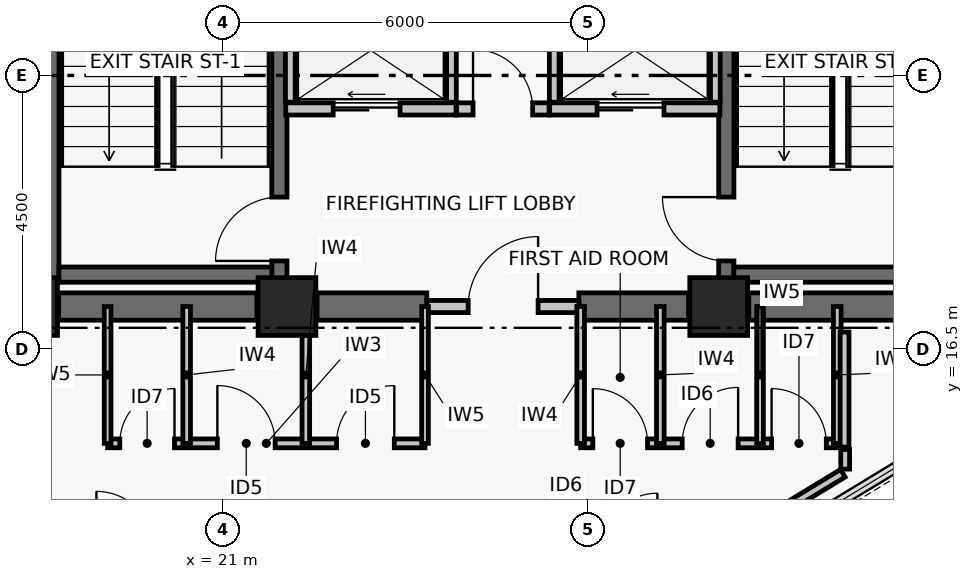
"""IFC4 building model, lengths in metres.
Left out: names, types, materials, properties, quantities, classifications, styles, units other than length and angle.
Written with IfcOpenShell. Run it as: python <this file> out.ifc"""

import sys

from ifc_helpers import new_model, si_unit, direction, frame, frame_2d, origin, origin_2d, place, context, subcontext, project, spatial, rectangle, extrude, element, fill, save


model = new_model("IFC4")
c1 = context("Model", 3, precision=1e-05, world=origin(), true_north=direction((0.0, 1.0)))
c2 = subcontext(c1, "Body", "Model", "MODEL_VIEW")
j1 = project(units=[si_unit("LENGTHUNIT", "METRE"), si_unit("PLANEANGLEUNIT", "RADIAN")], contexts=[c1])
p1 = place(None, origin())
s1 = spatial("IfcSite", under=j1, at=p1, CompositionType="ELEMENT")
p2 = place(p1, origin())
s2 = spatial("IfcBuilding", under=s1, at=p2, CompositionType="ELEMENT")
p3 = place(p2, frame((0.0, 0.0, 269.46)))
s3 = spatial("IfcBuildingStorey", under=s2, at=p3, CompositionType="ELEMENT", Elevation=269.46)
for number, where, z_axis, x_axis in (
    (1, (17.8, 17.2, 0.0), (0.0, 0.0, 1.0), (1.0, 0.0, 0.0)),
    (2, (22.05, 17.2, 0.0), (0.0, 0.0, 1.0), (1.0, 0.0, 0.0)),
    (3, (29.15, 17.2, 0.0), (0.0, 0.0, 1.0), (1.0, 0.0, 0.0)),
):
    element("IfcColumn", number, at=place(p3, frame(where, z_axis=z_axis, x_axis=x_axis)), inside=s3, PredefinedType="COLUMN", context=c2, shape_type="SweptSolid", body=[
        extrude(rectangle(XDim=0.95, YDim=0.95, at=origin_2d()), origin(), (0.0, 0.0, 1.0), 3.72),
    ])
p4 = place(p3, frame((18.295, 17.2, 0.0), z_axis=(0.0, 0.0, 1.0), x_axis=(1.0, 0.0, 0.0)))
e4 = element("IfcWall", 4, at=p4, inside=s3, PredefinedType="SHEAR", context=c2, shape_type="SweptSolid", body=[
    extrude(rectangle(XDim=3.26, YDim=0.45, at=frame_2d((1.63, 0.0))), origin(), (0.0, 0.0, 1.0), 3.5),
])
p5 = place(p3, frame((22.545, 17.2, 0.0), z_axis=(0.0, 0.0, 1.0), x_axis=(1.0, 0.0, 0.0)))
e5 = element("IfcWall", 5, at=p5, inside=s3, PredefinedType="SHEAR", context=c2, shape_type="SweptSolid", body=[
    extrude(rectangle(XDim=1.805, YDim=0.45, at=frame_2d((0.903, 0.0))), origin(), (0.0, 0.0, 1.0), 3.5),
])
p6 = place(p3, frame((26.85, 17.2, 0.0), z_axis=(0.0, 0.0, 1.0), x_axis=(1.0, 0.0, 0.0)))
e6 = element("IfcWall", 6, at=p6, inside=s3, PredefinedType="SHEAR", context=c2, shape_type="SweptSolid", body=[
    extrude(rectangle(XDim=1.805, YDim=0.45, at=frame_2d((0.902, 0.0))), origin(), (0.0, 0.0, 1.0), 3.5),
])
p7 = place(p3, frame((29.645, 17.2, 0.0), z_axis=(0.0, 0.0, 1.0), x_axis=(1.0, 0.0, 0.0)))
e7 = element("IfcWall", 7, at=p7, inside=s3, PredefinedType="SHEAR", context=c2, shape_type="SweptSolid", body=[
    extrude(rectangle(XDim=3.26, YDim=0.45, at=frame_2d((1.63, 0.0))), origin(), (0.0, 0.0, 1.0), 3.5),
])
p8 = place(p3, frame((18.175, 17.6, 0.0), z_axis=(0.0, 0.0, 1.0), x_axis=(0.0, 1.0, 0.0)))
e8 = element("IfcWall", 8, at=p8, inside=s3, PredefinedType="SHEAR", context=c2, shape_type="SweptSolid", body=[
    extrude(rectangle(XDim=8.8, YDim=0.25, at=frame_2d((4.4, 0.0))), origin(), (0.0, 0.0, 1.0), 3.5),
])
p9 = place(p3, frame((21.925, 17.6, 0.0), z_axis=(0.0, 0.0, 1.0), x_axis=(0.0, 1.0, 0.0)))
e9 = element("IfcWall", 9, at=p9, inside=s3, PredefinedType="SHEAR", context=c2, shape_type="SweptSolid", body=[
    extrude(rectangle(XDim=8.8, YDim=0.25, at=frame_2d((4.4, 0.0))), origin(), (0.0, 0.0, 1.0), 3.5),
])
p10 = place(p9, frame((0.35, 0.0, 0.0)))
e10 = element("IfcOpeningElement", 10, at=p10, cuts=e9, PredefinedType="OPENING", context=c2, shape_type="SweptSolid", body=[
    extrude(rectangle(XDim=1.05, YDim=2.08, at=frame_2d((0.525, 1.04))), frame((0.0, 0.135, 0.0), z_axis=(0.0, -1.0, 0.0), x_axis=(1.0, 0.0, 0.0)), (0.0, 0.0, 1.0), 0.27),
])
p11 = place(p3, frame((18.3, 17.725, 0.0), z_axis=(0.0, 0.0, 1.0), x_axis=(1.0, 0.0, 0.0)))
e11 = element("IfcWall", 11, at=p11, inside=s3, PredefinedType="SHEAR", context=c2, shape_type="SweptSolid", body=[
    extrude(rectangle(XDim=3.5, YDim=0.25, at=frame_2d((1.75, 0.0))), origin(), (0.0, 0.0, 1.0), 3.5),
])
p12 = place(p3, frame((29.275, 17.6, 0.0), z_axis=(0.0, 0.0, 1.0), x_axis=(0.0, 1.0, 0.0)))
e12 = element("IfcWall", 12, at=p12, inside=s3, PredefinedType="SHEAR", context=c2, shape_type="SweptSolid", body=[
    extrude(rectangle(XDim=8.8, YDim=0.25, at=frame_2d((4.4, 0.0))), origin(), (0.0, 0.0, 1.0), 3.5),
])
p13 = place(p12, frame((0.35, 0.0, 0.0)))
e13 = element("IfcOpeningElement", 13, at=p13, cuts=e12, PredefinedType="OPENING", context=c2, shape_type="SweptSolid", body=[
    extrude(rectangle(XDim=1.05, YDim=2.08, at=frame_2d((0.525, 1.04))), frame((0.0, 0.135, 0.0), z_axis=(0.0, -1.0, 0.0), x_axis=(1.0, 0.0, 0.0)), (0.0, 0.0, 1.0), 0.27),
])
p14 = place(p3, frame((29.4, 17.725, 0.0), z_axis=(0.0, 0.0, 1.0), x_axis=(1.0, 0.0, 0.0)))
e14 = element("IfcWall", 14, at=p14, inside=s3, PredefinedType="SHEAR", context=c2, shape_type="SweptSolid", body=[
    extrude(rectangle(XDim=3.5, YDim=0.25, at=frame_2d((1.75, 0.0))), origin(), (0.0, 0.0, 1.0), 3.5),
])
p15 = place(p3, frame((24.35, 17.2, 0.0), z_axis=(0.0, 0.0, 1.0), x_axis=(1.0, 0.0, 0.0)))
e15 = element("IfcWall", 15, at=p15, inside=s3, PredefinedType="PARTITIONING", context=c2, shape_type="SweptSolid", body=[
    extrude(rectangle(XDim=2.5, YDim=0.2, at=frame_2d((1.25, 0.0))), origin(), (0.0, 0.0, 1.0), 2.63),
])
p16 = place(p15, frame((0.68, 0.0, 0.0)))
e16 = element("IfcOpeningElement", 16, at=p16, cuts=e15, PredefinedType="OPENING", context=c2, shape_type="SweptSolid", body=[
    extrude(rectangle(XDim=1.15, YDim=2.08, at=frame_2d((0.575, 1.04))), frame((0.0, 0.11, 0.0), z_axis=(0.0, -1.0, 0.0), x_axis=(1.0, 0.0, 0.0)), (0.0, 0.0, 1.0), 0.22),
])
p17 = place(p3, frame((24.84, 20.45, 0.0), z_axis=(0.0, 0.0, 1.0), x_axis=(1.0, 0.0, 0.0)))
e17 = element("IfcWall", 17, at=p17, inside=s3, PredefinedType="PARTITIONING", context=c2, shape_type="SweptSolid", body=[
    extrude(rectangle(XDim=1.52, YDim=0.2, at=frame_2d((0.76, 0.0))), origin(), (0.0, 0.0, 1.0), 3.5),
])
p18 = place(p17, frame((0.27, 0.0, 0.0)))
e18 = element("IfcOpeningElement", 18, at=p18, cuts=e17, PredefinedType="OPENING", context=c2, shape_type="SweptSolid", body=[
    extrude(rectangle(XDim=0.98, YDim=2.06, at=frame_2d((0.49, 1.03))), frame((0.0, 0.11, 0.0), z_axis=(0.0, -1.0, 0.0), x_axis=(1.0, 0.0, 0.0)), (0.0, 0.0, 1.0), 0.22),
])
p19 = place(p3, frame((22.03, 20.45, 0.0), z_axis=(0.0, 0.0, 1.0), x_axis=(1.0, 0.0, 0.0)))
e19 = element("IfcWall", 19, at=p19, inside=s3, PredefinedType="PARTITIONING", context=c2, shape_type="SweptSolid", body=[
    extrude(rectangle(XDim=2.8, YDim=0.2, at=frame_2d((1.4, 0.0))), origin(), (0.0, 0.0, 1.0), 3.5),
])
p20 = place(p19, frame((0.78, 0.0, 0.0)))
e20 = element("IfcOpeningElement", 20, at=p20, cuts=e19, PredefinedType="OPENING", context=c2, shape_type="SweptSolid", body=[
    extrude(rectangle(XDim=1.1, YDim=2.08, at=frame_2d((0.55, 1.04))), frame((0.0, 0.11, 0.0), z_axis=(0.0, -1.0, 0.0), x_axis=(1.0, 0.0, 0.0)), (0.0, 0.0, 1.0), 0.22),
])
p21 = place(p3, frame((26.37, 20.45, 0.0), z_axis=(0.0, 0.0, 1.0), x_axis=(1.0, 0.0, 0.0)))
e21 = element("IfcWall", 21, at=p21, inside=s3, PredefinedType="PARTITIONING", context=c2, shape_type="SweptSolid", body=[
    extrude(rectangle(XDim=2.8, YDim=0.2, at=frame_2d((1.4, 0.0))), origin(), (0.0, 0.0, 1.0), 3.5),
])
p22 = place(p21, frame((0.78, 0.0, 0.0)))
e22 = element("IfcOpeningElement", 22, at=p22, cuts=e21, PredefinedType="OPENING", context=c2, shape_type="SweptSolid", body=[
    extrude(rectangle(XDim=1.1, YDim=2.08, at=frame_2d((0.55, 1.04))), frame((0.0, 0.11, 0.0), z_axis=(0.0, -1.0, 0.0), x_axis=(1.0, 0.0, 0.0)), (0.0, 0.0, 1.0), 0.22),
])
for number, where, z_axis, x_axis in (
    (23, (22.105, 20.56, 0.0), (0.0, 0.0, 1.0), (0.0, 1.0, 0.0)),
    (24, (24.755, 20.56, 0.0), (0.0, 0.0, 1.0), (0.0, 1.0, 0.0)),
):
    element("IfcWall", number, at=place(p3, frame(where, z_axis=z_axis, x_axis=x_axis)), inside=s3, PredefinedType="PARTITIONING", context=c2, shape_type="SweptSolid", body=[
        extrude(rectangle(XDim=1.71, YDim=0.16, at=frame_2d((0.855, 0.0))), origin(), (0.0, 0.0, 1.0), 3.5),
    ])
p23 = place(p3, frame((29.095, 20.56, 0.0), z_axis=(0.0, 0.0, 1.0), x_axis=(0.0, 1.0, 0.0)))
e25 = element("IfcWall", 25, at=p23, inside=s3, PredefinedType="PARTITIONING", context=c2, shape_type="SweptSolid", body=[
    extrude(rectangle(XDim=3.58, YDim=0.16, at=frame_2d((1.79, 0.0))), origin(), (0.0, 0.0, 1.0), 3.5),
])
p24 = place(p3, frame((26.445, 20.56, 0.0), z_axis=(0.0, 0.0, 1.0), x_axis=(0.0, 1.0, 0.0)))
e26 = element("IfcWall", 26, at=p24, inside=s3, PredefinedType="PARTITIONING", context=c2, shape_type="SweptSolid", body=[
    extrude(rectangle(XDim=1.71, YDim=0.16, at=frame_2d((0.855, 0.0))), origin(), (0.0, 0.0, 1.0), 3.5),
])
p25 = place(p3, frame((19.1, 14.95, 0.0), z_axis=(0.0, 0.0, 1.0), x_axis=(1.0, 0.0, 0.0)))
e27 = element("IfcWall", 27, at=p25, inside=s3, PredefinedType="PARTITIONING", context=c2, shape_type="SweptSolid", body=[
    extrude(rectangle(XDim=5.22, YDim=0.145, at=frame_2d((2.61, 0.0))), origin(), (0.0, 0.0, 1.0), 2.78),
])
p26 = place(p25, frame((0.2, 0.0, 0.0)))
e28 = element("IfcOpeningElement", 28, at=p26, cuts=e27, PredefinedType="OPENING", context=c2, shape_type="SweptSolid", body=[
    extrude(rectangle(XDim=0.9, YDim=2.02, at=frame_2d((0.45, 1.01))), frame((0.0, 0.083, 0.0), z_axis=(0.0, -1.0, 0.0), x_axis=(1.0, 0.0, 0.0)), (0.0, 0.0, 1.0), 0.165),
])
p27 = place(p25, frame((1.805, 0.0, 0.0)))
e29 = element("IfcOpeningElement", 29, at=p27, cuts=e27, PredefinedType="OPENING", context=c2, shape_type="SweptSolid", body=[
    extrude(rectangle(XDim=0.95, YDim=2.06, at=frame_2d((0.475, 1.03))), frame((0.0, 0.083, 0.0), z_axis=(0.0, -1.0, 0.0), x_axis=(1.0, 0.0, 0.0)), (0.0, 0.0, 1.0), 0.165),
])
p28 = place(p25, frame((3.765, 0.0, 0.0)))
e30 = element("IfcOpeningElement", 30, at=p28, cuts=e27, PredefinedType="OPENING", context=c2, shape_type="SweptSolid", body=[
    extrude(rectangle(XDim=0.95, YDim=2.06, at=frame_2d((0.475, 1.03))), frame((0.0, 0.083, 0.0), z_axis=(0.0, -1.0, 0.0), x_axis=(1.0, 0.0, 0.0)), (0.0, 0.0, 1.0), 0.165),
])
p29 = place(p3, frame((26.88, 14.95, 0.0), z_axis=(0.0, 0.0, 1.0), x_axis=(1.0, 0.0, 0.0)))
e31 = element("IfcWall", 31, at=p29, inside=s3, PredefinedType="PARTITIONING", context=c2, shape_type="SweptSolid", body=[
    extrude(rectangle(XDim=4.22, YDim=0.145, at=frame_2d((2.11, 0.0))), origin(), (0.0, 0.0, 1.0), 2.98),
])
p30 = place(p29, frame((0.2, 0.0, 0.0)))
e32 = element("IfcOpeningElement", 32, at=p30, cuts=e31, PredefinedType="OPENING", context=c2, shape_type="SweptSolid", body=[
    extrude(rectangle(XDim=0.9, YDim=2.02, at=frame_2d((0.45, 1.01))), frame((0.0, 0.083, 0.0), z_axis=(0.0, -1.0, 0.0), x_axis=(1.0, 0.0, 0.0)), (0.0, 0.0, 1.0), 0.165),
])
p31 = place(p29, frame((1.67, 0.0, 0.0)))
e33 = element("IfcOpeningElement", 33, at=p31, cuts=e31, PredefinedType="OPENING", context=c2, shape_type="SweptSolid", body=[
    extrude(rectangle(XDim=0.92, YDim=2.05, at=frame_2d((0.46, 1.025))), frame((0.0, 0.083, 0.0), z_axis=(0.0, -1.0, 0.0), x_axis=(1.0, 0.0, 0.0)), (0.0, 0.0, 1.0), 0.165),
])
p32 = place(p29, frame((3.14, 0.0, 0.0)))
e34 = element("IfcOpeningElement", 34, at=p32, cuts=e31, PredefinedType="OPENING", context=c2, shape_type="SweptSolid", body=[
    extrude(rectangle(XDim=0.9, YDim=2.02, at=frame_2d((0.45, 1.01))), frame((0.0, 0.083, 0.0), z_axis=(0.0, -1.0, 0.0), x_axis=(1.0, 0.0, 0.0)), (0.0, 0.0, 1.0), 0.165),
])
p33 = place(p3, frame((19.1, 14.95, 0.0), z_axis=(0.0, 0.0, 1.0), x_axis=(0.0, 1.0, 0.0)))
e35 = element("IfcWall", 35, at=p33, inside=s3, PredefinedType="PARTITIONING", context=c2, shape_type="SweptSolid", body=[
    extrude(rectangle(XDim=2.25, YDim=0.11, at=frame_2d((1.125, 0.0))), origin(), (0.0, 0.0, 1.0), 2.63),
])
for number, where, z_axis, x_axis in (
    (36, (20.4, 14.95, 0.0), (0.0, 0.0, 1.0), (0.0, 1.0, 0.0)),
    (37, (22.36, 14.95, 0.0), (0.0, 0.0, 1.0), (0.0, 1.0, 0.0)),
):
    element("IfcWall", number, at=place(p3, frame(where, z_axis=z_axis, x_axis=x_axis)), inside=s3, PredefinedType="PARTITIONING", context=c2, shape_type="SweptSolid", body=[
        extrude(rectangle(XDim=2.25, YDim=0.125, at=frame_2d((1.125, 0.0))), origin(), (0.0, 0.0, 1.0), 2.63),
    ])
p34 = place(p3, frame((24.32, 14.95, 0.0), z_axis=(0.0, 0.0, 1.0), x_axis=(0.0, 1.0, 0.0)))
e38 = element("IfcWall", 38, at=p34, inside=s3, PredefinedType="PARTITIONING", context=c2, shape_type="SweptSolid", body=[
    extrude(rectangle(XDim=2.25, YDim=0.11, at=frame_2d((1.125, 0.0))), origin(), (0.0, 0.0, 1.0), 2.63),
])
for number, where, z_axis, x_axis in (
    (39, (26.88, 14.95, 0.0), (0.0, 0.0, 1.0), (0.0, 1.0, 0.0)),
    (40, (28.19, 14.95, 0.0), (0.0, 0.0, 1.0), (0.0, 1.0, 0.0)),
):
    element("IfcWall", number, at=place(p3, frame(where, z_axis=z_axis, x_axis=x_axis)), inside=s3, PredefinedType="PARTITIONING", context=c2, shape_type="SweptSolid", body=[
        extrude(rectangle(XDim=2.25, YDim=0.125, at=frame_2d((1.125, 0.0))), origin(), (0.0, 0.0, 1.0), 2.63),
    ])
p35 = place(p3, frame((29.83, 14.95, 0.0), z_axis=(0.0, 0.0, 1.0), x_axis=(0.0, 1.0, 0.0)))
e41 = element("IfcWall", 41, at=p35, inside=s3, PredefinedType="PARTITIONING", context=c2, shape_type="SweptSolid", body=[
    extrude(rectangle(XDim=2.25, YDim=0.11, at=frame_2d((1.125, 0.0))), origin(), (0.0, 0.0, 1.0), 2.63),
])
p36 = place(p3, frame((31.1, 14.95, 0.0), z_axis=(0.0, 0.0, 1.0), x_axis=(0.0, 1.0, 0.0)))
e42 = element("IfcWall", 42, at=p36, inside=s3, PredefinedType="PARTITIONING", context=c2, shape_type="SweptSolid", body=[
    extrude(rectangle(XDim=2.25, YDim=0.125, at=frame_2d((1.125, 0.0))), origin(), (0.0, 0.0, 1.0), 2.63),
])
p37 = place(p3, frame((29.168, 13.229, 0.0), z_axis=(0.0, 0.0, 1.0), x_axis=(0.854678044033, 0.519158396876, 0.0)))
e43 = element("IfcWall", 43, at=p37, inside=s3, PredefinedType="PARTITIONING", context=c2, shape_type="SweptSolid", body=[
    extrude(rectangle(XDim=2.368, YDim=0.145, at=frame_2d((1.184, 0.0))), origin(), (0.0, 0.0, 1.0), 3.5),
])
p38 = place(p3, frame((31.23, 14.526, 0.0), z_axis=(0.0, 0.0, 1.0), x_axis=(0.0, 1.0, 0.0)))
e44 = element("IfcWall", 44, at=p38, inside=s3, PredefinedType="PARTITIONING", context=c2, shape_type="SweptSolid", body=[
    extrude(rectangle(XDim=0.324, YDim=0.145, at=frame_2d((0.162, 0.0))), origin(), (0.0, 0.0, 1.0), 3.5),
])
p39 = place(p3, frame((31.22, 14.889, 0.0), z_axis=(0.0, 0.0, 1.0), x_axis=(0.0, 1.0, 0.0)))
e45 = element("IfcWall", 45, at=p39, inside=s3, PredefinedType="PARTITIONING", context=c2, shape_type="SweptSolid", body=[
    extrude(rectangle(XDim=1.891, YDim=0.145, at=frame_2d((0.946, 0.0))), origin(), (0.0, 0.0, 1.0), 2.63),
])
p40 = place(p10, origin())
e46 = element("IfcDoor", 46, at=p40, inside=s3, OperationType="SINGLE_SWING_LEFT", PredefinedType="DOOR", context=c2, shape_type="SweptSolid", body=[
    extrude(rectangle(XDim=1.05, YDim=2.08, at=frame_2d((0.525, 1.04))), frame((0.0, 0.025, 0.0), z_axis=(0.0, -1.0, 0.0), x_axis=(1.0, 0.0, 0.0)), (0.0, 0.0, 1.0), 0.05),
])
fill(e10, e46)
p41 = place(p13, origin())
e47 = element("IfcDoor", 47, at=p41, inside=s3, OperationType="SINGLE_SWING_RIGHT", PredefinedType="DOOR", context=c2, shape_type="SweptSolid", body=[
    extrude(rectangle(XDim=1.05, YDim=2.08, at=frame_2d((0.525, 1.04))), frame((0.0, 0.025, 0.0), z_axis=(0.0, -1.0, 0.0), x_axis=(1.0, 0.0, 0.0)), (0.0, 0.0, 1.0), 0.05),
])
fill(e13, e47)
p42 = place(p16, origin())
e48 = element("IfcDoor", 48, at=p42, inside=s3, OperationType="SINGLE_SWING_RIGHT", PredefinedType="DOOR", context=c2, shape_type="SweptSolid", body=[
    extrude(rectangle(XDim=1.15, YDim=2.08, at=frame_2d((0.575, 1.04))), frame((0.0, 0.025, 0.0), z_axis=(0.0, -1.0, 0.0), x_axis=(1.0, 0.0, 0.0)), (0.0, 0.0, 1.0), 0.05),
])
fill(e16, e48)
p43 = place(p18, origin())
e49 = element("IfcDoor", 49, at=p43, inside=s3, OperationType="SINGLE_SWING_LEFT", PredefinedType="DOOR", context=c2, shape_type="SweptSolid", body=[
    extrude(rectangle(XDim=0.98, YDim=2.06, at=frame_2d((0.49, 1.03))), frame((0.0, 0.025, 0.0), z_axis=(0.0, -1.0, 0.0), x_axis=(1.0, 0.0, 0.0)), (0.0, 0.0, 1.0), 0.05),
])
fill(e18, e49)
p44 = place(p20, origin())
e50 = element("IfcDoor", 50, at=p44, inside=s3, OperationType="DOUBLE_DOOR_SLIDING", PredefinedType="DOOR", context=c2, shape_type="SweptSolid", body=[
    extrude(rectangle(XDim=1.1, YDim=2.08, at=frame_2d((0.55, 1.04))), frame((0.0, 0.025, 0.0), z_axis=(0.0, -1.0, 0.0), x_axis=(1.0, 0.0, 0.0)), (0.0, 0.0, 1.0), 0.05),
])
fill(e20, e50)
p45 = place(p22, origin())
e51 = element("IfcDoor", 51, at=p45, inside=s3, OperationType="DOUBLE_DOOR_SLIDING", PredefinedType="DOOR", context=c2, shape_type="SweptSolid", body=[
    extrude(rectangle(XDim=1.1, YDim=2.08, at=frame_2d((0.55, 1.04))), frame((0.0, 0.025, 0.0), z_axis=(0.0, -1.0, 0.0), x_axis=(1.0, 0.0, 0.0)), (0.0, 0.0, 1.0), 0.05),
])
fill(e22, e51)
p46 = place(p26, origin())
e52 = element("IfcDoor", 52, at=p46, inside=s3, OperationType="SINGLE_SWING_RIGHT", PredefinedType="DOOR", context=c2, shape_type="SweptSolid", body=[
    extrude(rectangle(XDim=0.9, YDim=2.02, at=frame_2d((0.45, 1.01))), frame((0.0, 0.025, 0.0), z_axis=(0.0, -1.0, 0.0), x_axis=(1.0, 0.0, 0.0)), (0.0, 0.0, 1.0), 0.05),
])
fill(e28, e52)
p47 = place(p27, origin())
e53 = element("IfcDoor", 53, at=p47, inside=s3, OperationType="SINGLE_SWING_LEFT", PredefinedType="DOOR", context=c2, shape_type="SweptSolid", body=[
    extrude(rectangle(XDim=0.95, YDim=2.06, at=frame_2d((0.475, 1.03))), frame((0.0, 0.025, 0.0), z_axis=(0.0, -1.0, 0.0), x_axis=(1.0, 0.0, 0.0)), (0.0, 0.0, 1.0), 0.05),
])
fill(e29, e53)
p48 = place(p28, origin())
e54 = element("IfcDoor", 54, at=p48, inside=s3, OperationType="SINGLE_SWING_RIGHT", PredefinedType="DOOR", context=c2, shape_type="SweptSolid", body=[
    extrude(rectangle(XDim=0.95, YDim=2.06, at=frame_2d((0.475, 1.03))), frame((0.0, 0.025, 0.0), z_axis=(0.0, -1.0, 0.0), x_axis=(1.0, 0.0, 0.0)), (0.0, 0.0, 1.0), 0.05),
])
fill(e30, e54)
p49 = place(p30, origin())
e55 = element("IfcDoor", 55, at=p49, inside=s3, OperationType="SINGLE_SWING_LEFT", PredefinedType="DOOR", context=c2, shape_type="SweptSolid", body=[
    extrude(rectangle(XDim=0.9, YDim=2.02, at=frame_2d((0.45, 1.01))), frame((0.0, 0.025, 0.0), z_axis=(0.0, -1.0, 0.0), x_axis=(1.0, 0.0, 0.0)), (0.0, 0.0, 1.0), 0.05),
])
fill(e32, e55)
p50 = place(p31, origin())
e56 = element("IfcDoor", 56, at=p50, inside=s3, OperationType="SINGLE_SWING_RIGHT", PredefinedType="DOOR", context=c2, shape_type="SweptSolid", body=[
    extrude(rectangle(XDim=0.92, YDim=2.05, at=frame_2d((0.46, 1.025))), frame((0.0, 0.025, 0.0), z_axis=(0.0, -1.0, 0.0), x_axis=(1.0, 0.0, 0.0)), (0.0, 0.0, 1.0), 0.05),
])
fill(e33, e56)
p51 = place(p32, origin())
e57 = element("IfcDoor", 57, at=p51, inside=s3, OperationType="SINGLE_SWING_LEFT", PredefinedType="DOOR", context=c2, shape_type="SweptSolid", body=[
    extrude(rectangle(XDim=0.9, YDim=2.02, at=frame_2d((0.45, 1.01))), frame((0.0, 0.025, 0.0), z_axis=(0.0, -1.0, 0.0), x_axis=(1.0, 0.0, 0.0)), (0.0, 0.0, 1.0), 0.05),
])
fill(e34, e57)
save(model, sys.argv[1])
